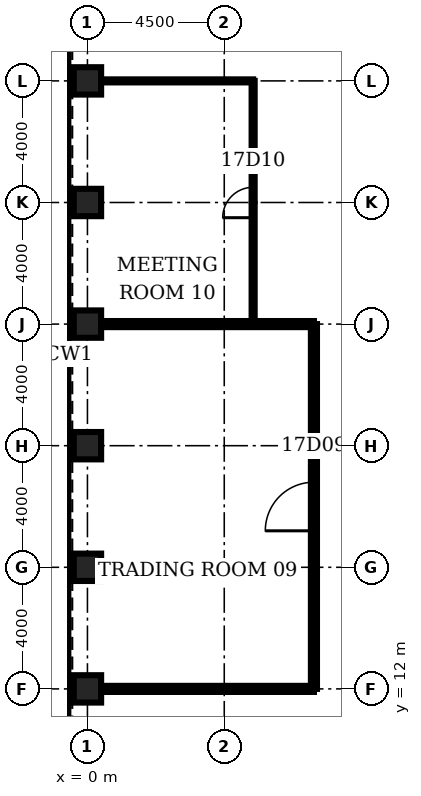
"""IFC4 building model, lengths in metres.
Left out: names, types, materials, properties, quantities, classifications, styles, units other than length and angle.
Written with IfcOpenShell. Run it as: python <this file> out.ifc"""

import sys

from ifc_helpers import new_model, si_unit, direction, frame, frame_2d, origin, origin_2d, place, context, subcontext, project, spatial, rectangle, hollow_rectangle, extrude, element, fill, save


model = new_model("IFC4")
c1 = context("Model", 3, precision=1e-05, world=origin(), true_north=direction((0.0, 1.0)))
c2 = subcontext(c1, "Body", "Model", "MODEL_VIEW")
j1 = project(units=[si_unit("LENGTHUNIT", "METRE"), si_unit("PLANEANGLEUNIT", "RADIAN")], contexts=[c1])
p1 = place(None, origin())
s1 = spatial("IfcSite", under=j1, at=p1, CompositionType="ELEMENT")
p2 = place(p1, origin())
s2 = spatial("IfcBuilding", under=s1, at=p2, CompositionType="ELEMENT")
p3 = place(p2, frame((0.0, 0.0, 81.5)))
s3 = spatial("IfcBuildingStorey", under=s2, at=p3, CompositionType="ELEMENT", Elevation=81.5)
for number, where, z_axis, x_axis in (
    (1, (0.0, 32.0, 0.0), (0.0, 0.0, 1.0), (1.0, 0.0, 0.0)),
    (2, (0.0, 28.0, 0.0), (0.0, 0.0, 1.0), (1.0, 0.0, 0.0)),
    (3, (0.0, 24.0, 0.0), (0.0, 0.0, 1.0), (1.0, 0.0, 0.0)),
    (4, (0.0, 20.0, 0.0), (0.0, 0.0, 1.0), (1.0, 0.0, 0.0)),
    (5, (0.0, 16.0, 0.0), (0.0, 0.0, 1.0), (1.0, 0.0, 0.0)),
    (6, (0.0, 12.0, 0.0), (0.0, 0.0, 1.0), (1.0, 0.0, 0.0)),
):
    element("IfcColumn", number, at=place(p3, frame(where, z_axis=z_axis, x_axis=x_axis)), inside=s3, PredefinedType="COLUMN", context=c2, shape_type="SweptSolid", body=[
        extrude(hollow_rectangle(XDim=0.9, YDim=0.9, WallThickness=0.11, at=origin_2d()), origin(), (0.0, 0.0, 1.0), 4.5),
    ])
for number, where, z_axis, x_axis in (
    (7, (0.45, 12.0, 0.0), (0.0, 0.0, 1.0), (1.0, 0.0, 0.0)),
    (8, (0.45, 24.0, 0.0), (0.0, 0.0, 1.0), (1.0, 0.0, 0.0)),
):
    element("IfcWall", number, at=place(p3, frame(where, z_axis=z_axis, x_axis=x_axis)), inside=s3, PredefinedType="PARTITIONING", context=c2, shape_type="SweptSolid", body=[
        extrude(rectangle(XDim=7.0, YDim=0.2, at=frame_2d((3.5, 0.0))), origin(), (0.0, 0.0, 1.0), 3.0),
    ])
p4 = place(p3, frame((0.45, 32.0, 0.0), z_axis=(0.0, 0.0, 1.0), x_axis=(1.0, 0.0, 0.0)))
e9 = element("IfcWall", 9, at=p4, inside=s3, PredefinedType="PARTITIONING", context=c2, shape_type="SweptSolid", body=[
    extrude(rectangle(XDim=5.0, YDim=0.1, at=frame_2d((2.5, 0.0))), origin(), (0.0, 0.0, 1.0), 3.0),
])
p5 = place(p3, frame((5.45, 24.0, 0.0), z_axis=(0.0, 0.0, 1.0), x_axis=(0.0, 1.0, 0.0)))
e10 = element("IfcWall", 10, at=p5, inside=s3, PredefinedType="PARTITIONING", context=c2, shape_type="SweptSolid", body=[
    extrude(rectangle(XDim=8.0, YDim=0.1, at=frame_2d((4.0, 0.0))), origin(), (0.0, 0.0, 1.0), 3.0),
])
p6 = place(p5, frame((3.5, 0.0, 0.0)))
e11 = element("IfcOpeningElement", 11, at=p6, cuts=e10, PredefinedType="OPENING", context=c2, shape_type="SweptSolid", body=[
    extrude(rectangle(XDim=1.0, YDim=2.1, at=frame_2d((0.5, 1.05))), frame((0.0, 0.06, 0.0), z_axis=(0.0, -1.0, 0.0), x_axis=(1.0, 0.0, 0.0)), (0.0, 0.0, 1.0), 0.12),
])
p7 = place(p3, frame((7.45, 12.0, 0.0), z_axis=(0.0, 0.0, 1.0), x_axis=(0.0, 1.0, 0.0)))
e12 = element("IfcWall", 12, at=p7, inside=s3, PredefinedType="PARTITIONING", context=c2, shape_type="SweptSolid", body=[
    extrude(rectangle(XDim=12.0, YDim=0.2, at=frame_2d((6.0, 0.0))), origin(), (0.0, 0.0, 1.0), 3.0),
])
p8 = place(p7, frame((5.2, 0.0, 0.0)))
e13 = element("IfcOpeningElement", 13, at=p8, cuts=e12, PredefinedType="OPENING", context=c2, shape_type="SweptSolid", body=[
    extrude(rectangle(XDim=1.6, YDim=2.1, at=frame_2d((0.8, 1.05))), frame((0.0, 0.11, 0.0), z_axis=(0.0, -1.0, 0.0), x_axis=(1.0, 0.0, 0.0)), (0.0, 0.0, 1.0), 0.22),
])
p9 = place(p8, origin())
e14 = element("IfcDoor", 14, at=p9, inside=s3, OperationType="SINGLE_SWING_LEFT", PredefinedType="DOOR", context=c2, shape_type="SweptSolid", body=[
    extrude(rectangle(XDim=1.6, YDim=2.1, at=frame_2d((0.8, 1.05))), frame((0.0, 0.025, 0.0), z_axis=(0.0, -1.0, 0.0), x_axis=(1.0, 0.0, 0.0)), (0.0, 0.0, 1.0), 0.05),
])
fill(e13, e14)
p10 = place(p6, origin())
e15 = element("IfcDoor", 15, at=p10, inside=s3, OperationType="SINGLE_SWING_LEFT", PredefinedType="DOOR", context=c2, shape_type="SweptSolid", body=[
    extrude(rectangle(XDim=1.0, YDim=2.1, at=frame_2d((0.5, 1.05))), frame((0.0, 0.025, 0.0), z_axis=(0.0, -1.0, 0.0), x_axis=(1.0, 0.0, 0.0)), (0.0, 0.0, 1.0), 0.05),
])
fill(e11, e15)
save(model, sys.argv[1])
